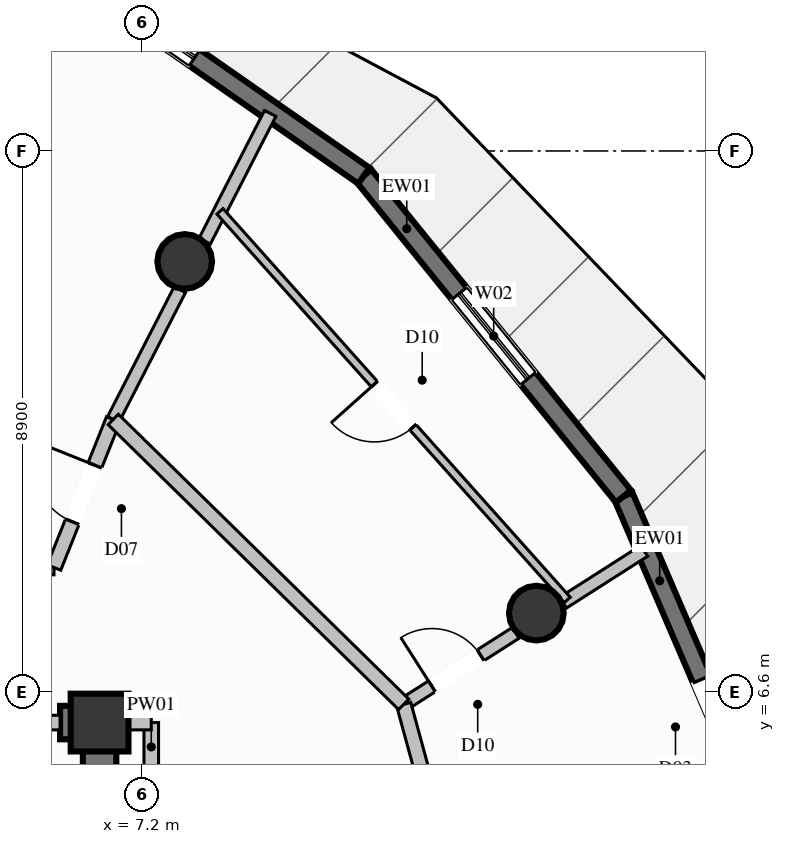
"""IFC4 building model, lengths in metres.
Left out: names, types, materials, properties, quantities, classifications, styles, units other than length and angle.
Written with IfcOpenShell. Run it as: python <this file> out.ifc"""

import sys

from ifc_helpers import new_model, si_unit, direction, frame, frame_2d, origin, origin_2d, place, context, subcontext, project, spatial, rectangle, circle, extrude, element, fill, save


model = new_model("IFC4")
c1 = context("Model", 3, precision=1e-05, world=origin(), true_north=direction((0.0, 1.0)))
c2 = subcontext(c1, "Body", "Model", "MODEL_VIEW")
j1 = project(units=[si_unit("LENGTHUNIT", "METRE"), si_unit("PLANEANGLEUNIT", "RADIAN")], contexts=[c1])
p1 = place(None, origin())
s1 = spatial("IfcSite", under=j1, at=p1, CompositionType="ELEMENT")
p2 = place(p1, origin())
s2 = spatial("IfcBuilding", under=s1, at=p2, CompositionType="ELEMENT")
p3 = place(p2, frame((0.0, 0.0, 187.6)))
s3 = spatial("IfcBuildingStorey", under=s2, at=p3, CompositionType="ELEMENT", Elevation=187.6)
p4 = place(p3, frame((6.5, 6.1, 0.0), z_axis=(0.0, 0.0, 1.0), x_axis=(1.0, 0.0, 0.0)))
e1 = element("IfcColumn", 1, at=p4, inside=s3, PredefinedType="COLUMN", context=c2, shape_type="SweptSolid", body=[
    extrude(rectangle(XDim=0.95, YDim=0.95, at=origin_2d()), origin(), (0.0, 0.0, 1.0), 3.6),
])
p5 = place(p3, frame((5.85, 6.1, 0.0), z_axis=(0.0, 0.0, 1.0), x_axis=(1.0, 0.0, 0.0)))
e2 = element("IfcWall", 2, at=p5, inside=s3, PredefinedType="SHEAR", context=c2, shape_type="SweptSolid", body=[
    extrude(rectangle(XDim=0.375, YDim=0.55, at=frame_2d((0.188, 0.0))), origin(), (0.0, 0.0, 1.0), 3.6),
])
p6 = place(p3, frame((6.5, 3.35, 0.0), z_axis=(0.0, 0.0, 1.0), x_axis=(0.0, 1.0, 0.0)))
e3 = element("IfcWall", 3, at=p6, inside=s3, PredefinedType="SHEAR", context=c2, shape_type="SweptSolid", body=[
    extrude(rectangle(XDim=3.025, YDim=0.55, at=frame_2d((1.512, 0.0))), origin(), (0.0, 0.0, 1.0), 3.6),
])
for number, where, z_axis, x_axis in (
    (4, (13.683, 7.9, 0.0), (0.0, 0.0, 1.0), (1.0, 0.0, 0.0)),
    (5, (7.9, 13.683, 0.0), (0.0, 0.0, 1.0), (1.0, 0.0, 0.0)),
):
    element("IfcColumn", number, at=place(p3, frame(where, z_axis=z_axis, x_axis=x_axis)), inside=s3, PredefinedType="COLUMN", context=c2, shape_type="SweptSolid", body=[
        extrude(circle(Radius=0.45, at=origin_2d()), origin(), (0.0, 0.0, 1.0), 3.6),
    ])
p7 = place(p3, frame((15.116, 9.82, 0.0), z_axis=(0.0, 0.0, 1.0), x_axis=(0.394518464568, -0.91888801337, 0.0)))
e6 = element("IfcWall", 6, at=p7, inside=s3, PredefinedType="SOLIDWALL", context=c2, shape_type="SweptSolid", body=[
    extrude(rectangle(XDim=6.785, YDim=0.32, at=frame_2d((3.393, 0.0))), origin(), (0.0, 0.0, 1.0), 3.36),
])
p8 = place(p7, frame((3.272, 0.0, 0.0)))
e7 = element("IfcOpeningElement", 7, at=p8, cuts=e6, PredefinedType="OPENING", context=c2, shape_type="SweptSolid", body=[
    extrude(rectangle(XDim=1.1, YDim=2.2, at=frame_2d((0.55, 1.1))), frame((0.0, 0.17, 0.0), z_axis=(0.0, -1.0, 0.0), x_axis=(1.0, 0.0, 0.0)), (0.0, 0.0, 1.0), 0.34),
])
p9 = place(p3, frame((10.846, 15.093, 0.0), z_axis=(0.0, 0.0, 1.0), x_axis=(0.629326572603, -0.777140955693, 0.0)))
e8 = element("IfcWall", 8, at=p9, inside=s3, PredefinedType="SOLIDWALL", context=c2, shape_type="SweptSolid", body=[
    extrude(rectangle(XDim=6.785, YDim=0.32, at=frame_2d((3.393, 0.0))), origin(), (0.0, 0.0, 1.0), 3.36),
])
p10 = place(p9, frame((2.493, 0.0, 0.35)))
e9 = element("IfcOpeningElement", 9, at=p10, cuts=e8, PredefinedType="OPENING", context=c2, shape_type="SweptSolid", body=[
    extrude(rectangle(XDim=1.8, YDim=2.6, at=frame_2d((0.9, 1.3))), frame((0.0, 0.17, 0.0), z_axis=(0.0, -1.0, 0.0), x_axis=(1.0, 0.0, 0.0)), (0.0, 0.0, 1.0), 0.34),
])
p11 = place(p3, frame((5.402, 18.889, 0.0), z_axis=(0.0, 0.0, 1.0), x_axis=(0.820277874486, -0.571965216275, 0.0)))
e10 = element("IfcWall", 10, at=p11, inside=s3, PredefinedType="SOLIDWALL", context=c2, shape_type="SweptSolid", body=[
    extrude(rectangle(XDim=6.636, YDim=0.32, at=frame_2d((3.318, 0.0))), origin(), (0.0, 0.0, 1.0), 3.36),
])
p12 = place(p11, frame((1.444, 0.0, 0.35)))
e11 = element("IfcOpeningElement", 11, at=p12, cuts=e10, PredefinedType="OPENING", context=c2, shape_type="SweptSolid", body=[
    extrude(rectangle(XDim=1.8, YDim=2.6, at=frame_2d((0.9, 1.3))), frame((0.0, 0.17, 0.0), z_axis=(0.0, -1.0, 0.0), x_axis=(1.0, 0.0, 0.0)), (0.0, 0.0, 1.0), 0.34),
])
p13 = place(p3, frame((-5.75, 8.65, 0.0), z_axis=(0.0, 0.0, 1.0), x_axis=(1.0, 0.0, 0.0)))
e12 = element("IfcWall", 12, at=p13, inside=s3, PredefinedType="PARTITIONING", context=c2, shape_type="SweptSolid", body=[
    extrude(rectangle(XDim=11.5, YDim=0.24, at=frame_2d((5.75, 0.0))), origin(), (0.0, 0.0, 1.0), 3.36),
])
p14 = place(p3, frame((3.0, 6.1, 0.0), z_axis=(0.0, 0.0, 1.0), x_axis=(1.0, 0.0, 0.0)))
e13 = element("IfcWall", 13, at=p14, inside=s3, PredefinedType="PARTITIONING", context=c2, shape_type="SweptSolid", body=[
    extrude(rectangle(XDim=2.85, YDim=0.24, at=frame_2d((1.425, 0.0))), origin(), (0.0, 0.0, 1.0), 2.445),
])
p15 = place(p3, frame((7.35, 5.3, 0.0), z_axis=(0.0, 0.0, 1.0), x_axis=(0.0, 1.0, 0.0)))
e14 = element("IfcWall", 14, at=p15, inside=s3, PredefinedType="PARTITIONING", context=c2, shape_type="SweptSolid", body=[
    extrude(rectangle(XDim=0.8, YDim=0.24, at=frame_2d((0.4, 0.0))), origin(), (0.0, 0.0, 1.0), 2.445),
])
p16 = place(p3, frame((6.5, 6.1, 0.0), z_axis=(0.0, 0.0, 1.0), x_axis=(1.0, 0.0, 0.0)))
e15 = element("IfcWall", 15, at=p16, inside=s3, PredefinedType="PARTITIONING", context=c2, shape_type="SweptSolid", body=[
    extrude(rectangle(XDim=0.85, YDim=0.24, at=frame_2d((0.425, 0.0))), origin(), (0.0, 0.0, 1.0), 2.801),
])
p17 = place(p3, frame((11.502, 6.4, 0.0), z_axis=(0.0, 0.0, 1.0), x_axis=(0.842942702802, 0.538003345522, 0.0)))
e16 = element("IfcWall", 16, at=p17, inside=s3, PredefinedType="PARTITIONING", context=c2, shape_type="SweptSolid", body=[
    extrude(rectangle(XDim=2.184, YDim=0.21, at=frame_2d((1.092, 0.0))), origin(), (0.0, 0.0, 1.0), 2.801),
])
p18 = place(p17, frame((0.55, 0.0, 0.0)))
e17 = element("IfcOpeningElement", 17, at=p18, cuts=e16, PredefinedType="OPENING", context=c2, shape_type="SweptSolid", body=[
    extrude(rectangle(XDim=0.95, YDim=2.1, at=frame_2d((0.475, 1.05))), frame((0.0, 0.115, 0.0), z_axis=(0.0, -1.0, 0.0), x_axis=(1.0, 0.0, 0.0)), (0.0, 0.0, 1.0), 0.23),
])
p19 = place(p3, frame((14.121, 8.071, 0.0), z_axis=(0.0, 0.0, 1.0), x_axis=(0.842835995137, 0.538170498357, 0.0)))
e18 = element("IfcWall", 18, at=p19, inside=s3, PredefinedType="PARTITIONING", context=c2, shape_type="SweptSolid", body=[
    extrude(rectangle(XDim=1.585, YDim=0.21, at=frame_2d((0.792, 0.0))), origin(), (0.0, 0.0, 1.0), 3.36),
])
p20 = place(p3, frame((6.725, 11.085, 0.0), z_axis=(0.0, 0.0, 1.0), x_axis=(0.456347633058, 0.889801572151, 0.0)))
e19 = element("IfcWall", 19, at=p20, inside=s3, PredefinedType="PARTITIONING", context=c2, shape_type="SweptSolid", body=[
    extrude(rectangle(XDim=2.399, YDim=0.21, at=frame_2d((1.2, 0.0))), origin(), (0.0, 0.0, 1.0), 2.801),
])
p21 = place(p3, frame((8.229, 14.018, 0.0), z_axis=(0.0, 0.0, 1.0), x_axis=(0.456335550331, 0.889807768849, 0.0)))
e20 = element("IfcWall", 20, at=p21, inside=s3, PredefinedType="PARTITIONING", context=c2, shape_type="SweptSolid", body=[
    extrude(rectangle(XDim=2.36, YDim=0.21, at=frame_2d((1.18, 0.0))), origin(), (0.0, 0.0, 1.0), 3.36),
])
p22 = place(p3, frame((5.75, 8.65, 0.0), z_axis=(0.0, 0.0, 1.0), x_axis=(0.371743694646, 0.928335405708, 0.0)))
e21 = element("IfcWall", 21, at=p22, inside=s3, PredefinedType="PARTITIONING", context=c2, shape_type="SweptSolid", body=[
    extrude(rectangle(XDim=2.623, YDim=0.24, at=frame_2d((1.312, 0.0))), origin(), (0.0, 0.0, 1.0), 3.36),
])
p23 = place(p22, frame((0.811, 0.0, 0.0)))
e22 = element("IfcOpeningElement", 22, at=p23, cuts=e21, PredefinedType="OPENING", context=c2, shape_type="SweptSolid", body=[
    extrude(rectangle(XDim=1.0, YDim=2.2, at=frame_2d((0.5, 1.1))), frame((0.0, 0.13, 0.0), z_axis=(0.0, -1.0, 0.0), x_axis=(1.0, 0.0, 0.0)), (0.0, 0.0, 1.0), 0.26),
])
p24 = place(p3, frame((13.25, 0.0, 0.0), z_axis=(0.0, 0.0, 1.0), x_axis=(-0.263484816116, 0.96466354325, 0.0)))
e23 = element("IfcWall", 23, at=p24, inside=s3, PredefinedType="PARTITIONING", context=c2, shape_type="SweptSolid", body=[
    extrude(rectangle(XDim=6.634, YDim=0.24, at=frame_2d((3.317, 0.0))), origin(), (0.0, 0.0, 1.0), 3.36),
])
p25 = place(p3, frame((11.502, 6.4, 0.0), z_axis=(0.0, 0.0, 1.0), x_axis=(-0.713933337596, 0.700213674152, 0.0)))
e24 = element("IfcWall", 24, at=p25, inside=s3, PredefinedType="PARTITIONING", context=c2, shape_type="SweptSolid", body=[
    extrude(rectangle(XDim=6.691, YDim=0.24, at=frame_2d((3.345, 0.0))), origin(), (0.0, 0.0, 1.0), 3.36),
])
p26 = place(p3, frame((14.191, 8.116, 0.0), z_axis=(0.0, 0.0, 1.0), x_axis=(-0.666313460935, 0.745671758736, 0.0)))
e25 = element("IfcWall", 25, at=p26, inside=s3, PredefinedType="PARTITIONING", context=c2, shape_type="SweptSolid", body=[
    extrude(rectangle(XDim=8.571, YDim=0.135, at=frame_2d((4.286, 0.0))), origin(), (0.0, 0.0, 1.0), 2.929),
])
p27 = place(p26, frame((3.81, 0.0, 0.0)))
e26 = element("IfcOpeningElement", 26, at=p27, cuts=e25, PredefinedType="OPENING", context=c2, shape_type="SweptSolid", body=[
    extrude(rectangle(XDim=0.95, YDim=2.1, at=frame_2d((0.475, 1.05))), frame((0.0, 0.078, 0.0), z_axis=(0.0, -1.0, 0.0), x_axis=(1.0, 0.0, 0.0)), (0.0, 0.0, 1.0), 0.155),
])
p28 = place(p8, origin())
e27 = element("IfcDoor", 27, at=p28, inside=s3, OperationType="SINGLE_SWING_RIGHT", PredefinedType="DOOR", context=c2, shape_type="SweptSolid", body=[
    extrude(rectangle(XDim=1.1, YDim=2.2, at=frame_2d((0.55, 1.1))), frame((0.0, 0.025, 0.0), z_axis=(0.0, -1.0, 0.0), x_axis=(1.0, 0.0, 0.0)), (0.0, 0.0, 1.0), 0.05),
])
fill(e7, e27)
p29 = place(p10, origin())
e28 = element("IfcWindow", 28, at=p29, inside=s3, PartitioningType="SINGLE_PANEL", PredefinedType="WINDOW", context=c2, shape_type="SweptSolid", body=[
    extrude(rectangle(XDim=1.8, YDim=2.6, at=frame_2d((0.9, 1.3))), frame((0.0, 0.03, 0.0), z_axis=(0.0, -1.0, 0.0), x_axis=(1.0, 0.0, 0.0)), (0.0, 0.0, 1.0), 0.06),
])
fill(e9, e28)
p30 = place(p12, origin())
e29 = element("IfcWindow", 29, at=p30, inside=s3, PartitioningType="SINGLE_PANEL", PredefinedType="WINDOW", context=c2, shape_type="SweptSolid", body=[
    extrude(rectangle(XDim=1.8, YDim=2.6, at=frame_2d((0.9, 1.3))), frame((0.0, 0.03, 0.0), z_axis=(0.0, -1.0, 0.0), x_axis=(1.0, 0.0, 0.0)), (0.0, 0.0, 1.0), 0.06),
])
fill(e11, e29)
p31 = place(p23, origin())
e30 = element("IfcDoor", 30, at=p31, inside=s3, OperationType="SINGLE_SWING_RIGHT", PredefinedType="DOOR", context=c2, shape_type="SweptSolid", body=[
    extrude(rectangle(XDim=1.0, YDim=2.2, at=frame_2d((0.5, 1.1))), frame((0.0, 0.025, 0.0), z_axis=(0.0, -1.0, 0.0), x_axis=(1.0, 0.0, 0.0)), (0.0, 0.0, 1.0), 0.05),
])
fill(e22, e30)
p32 = place(p18, origin())
e31 = element("IfcDoor", 31, at=p32, inside=s3, OperationType="SINGLE_SWING_LEFT", PredefinedType="DOOR", context=c2, shape_type="SweptSolid", body=[
    extrude(rectangle(XDim=0.95, YDim=2.1, at=frame_2d((0.475, 1.05))), frame((0.0, 0.025, 0.0), z_axis=(0.0, -1.0, 0.0), x_axis=(1.0, 0.0, 0.0)), (0.0, 0.0, 1.0), 0.05),
])
fill(e17, e31)
p33 = place(p27, origin())
e32 = element("IfcDoor", 32, at=p33, inside=s3, OperationType="SINGLE_SWING_RIGHT", PredefinedType="DOOR", context=c2, shape_type="SweptSolid", body=[
    extrude(rectangle(XDim=0.95, YDim=2.1, at=frame_2d((0.475, 1.05))), frame((0.0, 0.025, 0.0), z_axis=(0.0, -1.0, 0.0), x_axis=(1.0, 0.0, 0.0)), (0.0, 0.0, 1.0), 0.05),
])
fill(e26, e32)
save(model, sys.argv[1])
